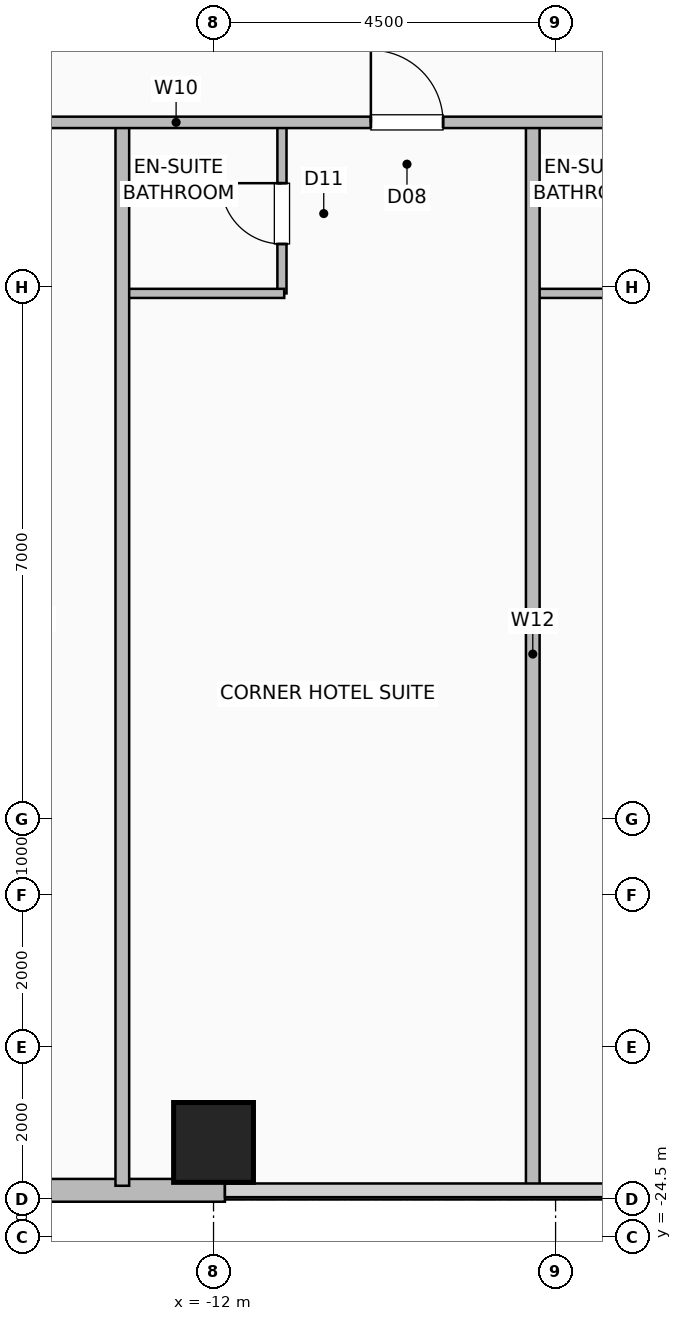
"""IFC4 building model, lengths in metres.
Left out: names, types, materials, properties, quantities, classifications, styles, units other than length and angle.
Written with IfcOpenShell. Run it as: python <this file> out.ifc"""

import sys

from ifc_helpers import new_model, si_unit, direction, frame, frame_2d, origin, origin_2d, place, context, subcontext, project, spatial, rectangle, hollow_rectangle, extrude, element, fill, save


model = new_model("IFC4")
c1 = context("Model", 3, precision=1e-05, world=origin(), true_north=direction((0.0, 1.0)))
c2 = subcontext(c1, "Body", "Model", "MODEL_VIEW")
j1 = project(units=[si_unit("LENGTHUNIT", "METRE"), si_unit("PLANEANGLEUNIT", "RADIAN")], contexts=[c1])
p1 = place(None, origin())
s1 = spatial("IfcSite", under=j1, at=p1, CompositionType="ELEMENT")
p2 = place(p1, origin())
s2 = spatial("IfcBuilding", under=s1, at=p2, CompositionType="ELEMENT")
p3 = place(p2, frame((0.0, 0.0, 76.0)))
s3 = spatial("IfcBuildingStorey", under=s2, at=p3, CompositionType="ELEMENT", Elevation=76.0)
p4 = place(p3, frame((-12.0, -23.25, 0.0), z_axis=(0.0, 0.0, 1.0), x_axis=(1.0, 0.0, 0.0)))
e1 = element("IfcColumn", 1, at=p4, inside=s3, PredefinedType="COLUMN", context=c2, shape_type="SweptSolid", body=[
    extrude(hollow_rectangle(XDim=1.05, YDim=1.05, WallThickness=0.05, at=origin_2d()), origin(), (0.0, 0.0, 1.0), 3.5),
])
p5 = place(p3, frame((-19.15, -23.88, 0.0), z_axis=(0.0, 0.0, 1.0), x_axis=(1.0, 0.0, 0.0)))
e2 = element("IfcWall", 2, at=p5, inside=s3, PredefinedType="SOLIDWALL", context=c2, shape_type="SweptSolid", body=[
    extrude(rectangle(XDim=7.3, YDim=0.3, at=frame_2d((3.65, 0.0))), origin(), (0.0, 0.0, 1.0), 3.25),
])
p6 = place(p3, frame((-11.1, -12.08, 0.0), z_axis=(0.0, 0.0, 1.0), x_axis=(0.0, 1.0, 0.0)))
e3 = element("IfcWall", 3, at=p6, inside=s3, PredefinedType="PLUMBINGWALL", context=c2, shape_type="SweptSolid", body=[
    extrude(rectangle(XDim=2.25, YDim=0.12, at=frame_2d((1.125, 0.0))), origin(), (0.0, 0.0, 1.0), 3.25),
])
p7 = place(p6, frame((0.65, 0.0, 0.0)))
e4 = element("IfcOpeningElement", 4, at=p7, cuts=e3, PredefinedType="OPENING", context=c2, shape_type="SweptSolid", body=[
    extrude(rectangle(XDim=0.8, YDim=2.05, at=frame_2d((0.4, 1.025))), frame((0.0, 0.07, 0.0), z_axis=(0.0, -1.0, 0.0), x_axis=(1.0, 0.0, 0.0)), (0.0, 0.0, 1.0), 0.14),
])
p8 = place(p3, frame((-13.17, -12.08, 0.0), z_axis=(0.0, 0.0, 1.0), x_axis=(1.0, 0.0, 0.0)))
e5 = element("IfcWall", 5, at=p8, inside=s3, PredefinedType="PLUMBINGWALL", context=c2, shape_type="SweptSolid", body=[
    extrude(rectangle(XDim=2.1, YDim=0.12, at=frame_2d((1.05, 0.0))), origin(), (0.0, 0.0, 1.0), 3.25),
])
p9 = place(p3, frame((-7.77, -12.08, 0.0), z_axis=(0.0, 0.0, 1.0), x_axis=(1.0, 0.0, 0.0)))
e6 = element("IfcWall", 6, at=p9, inside=s3, PredefinedType="PLUMBINGWALL", context=c2, shape_type="SweptSolid", body=[
    extrude(rectangle(XDim=2.1, YDim=0.12, at=frame_2d((1.05, 0.0))), origin(), (0.0, 0.0, 1.0), 3.25),
])
for number, where, z_axis, x_axis in (
    (7, (-13.2, -23.82, 0.0), (0.0, 0.0, 1.0), (0.0, 1.0, 0.0)),
    (8, (-7.8, -23.82, 0.0), (0.0, 0.0, 1.0), (0.0, 1.0, 0.0)),
):
    element("IfcWall", number, at=place(p3, frame(where, z_axis=z_axis, x_axis=x_axis)), inside=s3, PredefinedType="PARTITIONING", context=c2, shape_type="SweptSolid", body=[
        extrude(rectangle(XDim=13.99, YDim=0.18, at=frame_2d((6.995, 0.0))), origin(), (0.0, 0.0, 1.0), 3.25),
    ])
p10 = place(p3, frame((-19.95, -9.83, 0.0), z_axis=(0.0, 0.0, 1.0), x_axis=(1.0, 0.0, 0.0)))
e9 = element("IfcWall", 9, at=p10, inside=s3, PredefinedType="PARTITIONING", context=c2, shape_type="SweptSolid", body=[
    extrude(rectangle(XDim=39.9, YDim=0.15, at=frame_2d((19.95, 0.0))), origin(), (0.0, 0.0, 1.0), 3.25),
])
p11 = place(p10, frame((3.945, 0.0, 0.0)))
e10 = element("IfcOpeningElement", 10, at=p11, cuts=e9, PredefinedType="OPENING", context=c2, shape_type="SweptSolid", body=[
    extrude(rectangle(XDim=0.95, YDim=2.08, at=frame_2d((0.475, 1.04))), frame((0.0, 0.085, 0.0), z_axis=(0.0, -1.0, 0.0), x_axis=(1.0, 0.0, 0.0)), (0.0, 0.0, 1.0), 0.17),
])
p12 = place(p10, frame((10.02, 0.0, 0.0)))
e11 = element("IfcOpeningElement", 11, at=p12, cuts=e9, PredefinedType="OPENING", context=c2, shape_type="SweptSolid", body=[
    extrude(rectangle(XDim=0.95, YDim=2.08, at=frame_2d((0.475, 1.04))), frame((0.0, 0.085, 0.0), z_axis=(0.0, -1.0, 0.0), x_axis=(1.0, 0.0, 0.0)), (0.0, 0.0, 1.0), 0.17),
])
p13 = place(p10, frame((15.42, 0.0, 0.0)))
e12 = element("IfcOpeningElement", 12, at=p13, cuts=e9, PredefinedType="OPENING", context=c2, shape_type="SweptSolid", body=[
    extrude(rectangle(XDim=0.95, YDim=2.08, at=frame_2d((0.475, 1.04))), frame((0.0, 0.085, 0.0), z_axis=(0.0, -1.0, 0.0), x_axis=(1.0, 0.0, 0.0)), (0.0, 0.0, 1.0), 0.17),
])
p14 = place(p10, frame((20.702, 0.0, 0.0)))
e13 = element("IfcOpeningElement", 13, at=p14, cuts=e9, PredefinedType="OPENING", context=c2, shape_type="SweptSolid", body=[
    extrude(rectangle(XDim=0.95, YDim=2.08, at=frame_2d((0.475, 1.04))), frame((0.0, 0.085, 0.0), z_axis=(0.0, -1.0, 0.0), x_axis=(1.0, 0.0, 0.0)), (0.0, 0.0, 1.0), 0.17),
])
p15 = place(p10, frame((26.02, 0.0, 0.0)))
e14 = element("IfcOpeningElement", 14, at=p15, cuts=e9, PredefinedType="OPENING", context=c2, shape_type="SweptSolid", body=[
    extrude(rectangle(XDim=0.95, YDim=2.08, at=frame_2d((0.475, 1.04))), frame((0.0, 0.085, 0.0), z_axis=(0.0, -1.0, 0.0), x_axis=(1.0, 0.0, 0.0)), (0.0, 0.0, 1.0), 0.17),
])
p16 = place(p10, frame((31.37, 0.0, 0.0)))
e15 = element("IfcOpeningElement", 15, at=p16, cuts=e9, PredefinedType="OPENING", context=c2, shape_type="SweptSolid", body=[
    extrude(rectangle(XDim=0.95, YDim=2.08, at=frame_2d((0.475, 1.04))), frame((0.0, 0.085, 0.0), z_axis=(0.0, -1.0, 0.0), x_axis=(1.0, 0.0, 0.0)), (0.0, 0.0, 1.0), 0.17),
])
p17 = place(p10, frame((37.245, 0.0, 0.0)))
e16 = element("IfcOpeningElement", 16, at=p17, cuts=e9, PredefinedType="OPENING", context=c2, shape_type="SweptSolid", body=[
    extrude(rectangle(XDim=0.95, YDim=2.08, at=frame_2d((0.475, 1.04))), frame((0.0, 0.085, 0.0), z_axis=(0.0, -1.0, 0.0), x_axis=(1.0, 0.0, 0.0)), (0.0, 0.0, 1.0), 0.17),
])
p18 = place(p7, origin())
e17 = element("IfcDoor", 17, at=p18, inside=s3, OperationType="SINGLE_SWING_RIGHT", PredefinedType="DOOR", context=c2, shape_type="SweptSolid", body=[
    extrude(rectangle(XDim=0.8, YDim=2.05, at=frame_2d((0.4, 1.025))), frame((0.0, 0.025, 0.0), z_axis=(0.0, -1.0, 0.0), x_axis=(1.0, 0.0, 0.0)), (0.0, 0.0, 1.0), 0.05),
])
fill(e4, e17)
p19 = place(p12, origin())
e18 = element("IfcDoor", 18, at=p19, inside=s3, OperationType="SINGLE_SWING_LEFT", PredefinedType="DOOR", context=c2, shape_type="SweptSolid", body=[
    extrude(rectangle(XDim=0.95, YDim=2.08, at=frame_2d((0.475, 1.04))), frame((0.0, 0.025, 0.0), z_axis=(0.0, -1.0, 0.0), x_axis=(1.0, 0.0, 0.0)), (0.0, 0.0, 1.0), 0.05),
])
fill(e11, e18)
save(model, sys.argv[1])
